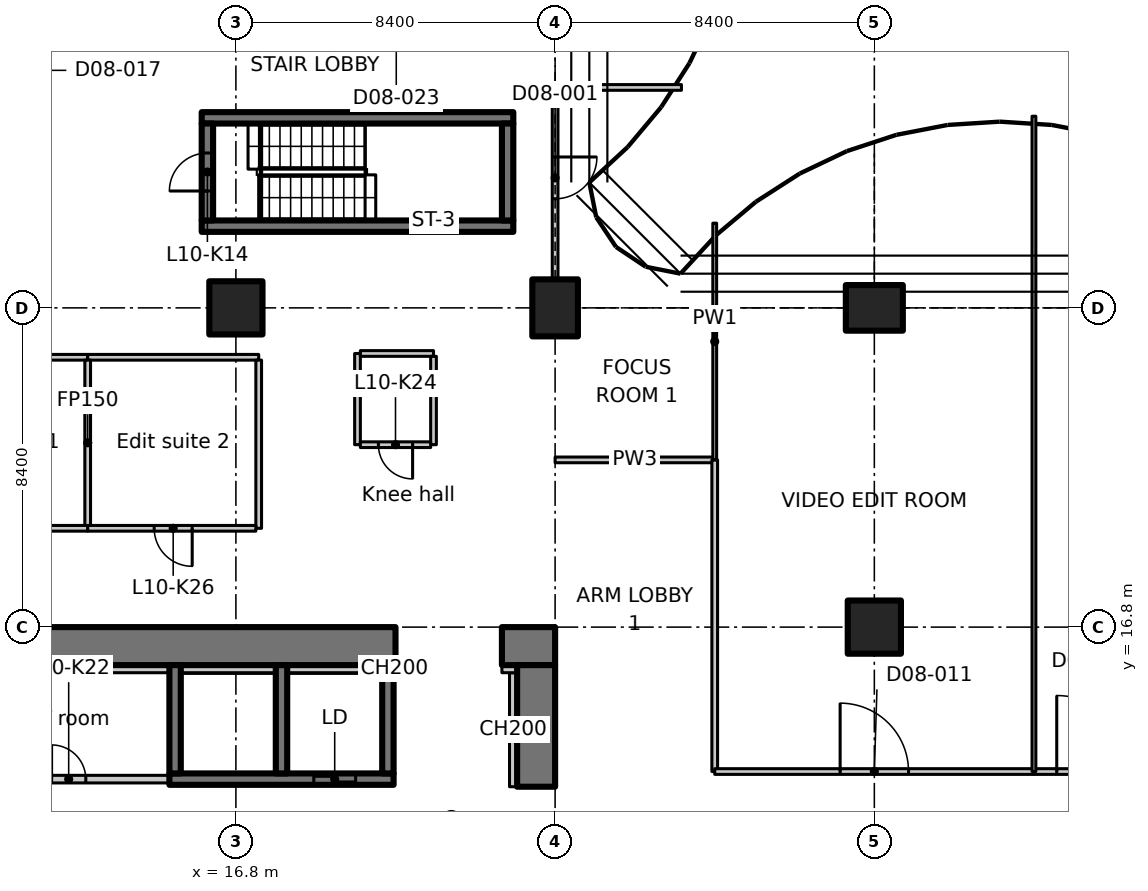
"""IFC4 building model, lengths in metres.
Left out: names, types, materials, properties, quantities, classifications, styles, units other than length and angle.
Written with IfcOpenShell. Run it as: python <this file> out.ifc"""

import sys

from ifc_helpers import new_model, si_unit, direction, frame, frame_2d, origin, origin_2d, place, context, subcontext, project, spatial, polyline, rectangle, outline, extrude, element, fill, save


model = new_model("IFC4")
c1 = context("Model", 3, precision=1e-05, world=origin(), true_north=direction((0.0, 1.0)))
c2 = subcontext(c1, "Body", "Model", "MODEL_VIEW")
j1 = project(units=[si_unit("LENGTHUNIT", "METRE"), si_unit("PLANEANGLEUNIT", "RADIAN")], contexts=[c1])
p1 = place(None, origin())
s1 = spatial("IfcSite", under=j1, at=p1, CompositionType="ELEMENT")
p2 = place(p1, origin())
s2 = spatial("IfcBuilding", under=s1, at=p2, CompositionType="ELEMENT")
p3 = place(p2, frame((0.0, 0.0, 50.9)))
s3 = spatial("IfcBuildingStorey", under=s2, at=p3, CompositionType="ELEMENT", Elevation=50.9)
p4 = place(p3, frame((16.8, 25.2, 0.0), z_axis=(0.0, 0.0, 1.0), x_axis=(1.0, 0.0, 0.0)))
e1 = element("IfcColumn", 1, at=p4, inside=s3, PredefinedType="COLUMN", context=c2, shape_type="SweptSolid", body=[
    extrude(rectangle(XDim=1.4, YDim=1.4, at=origin_2d()), origin(), (0.0, 0.0, 1.0), 3.35),
])
p5 = place(p3, frame((25.2, 25.2, 0.0), z_axis=(0.0, 0.0, 1.0), x_axis=(1.0, 0.0, 0.0)))
e2 = element("IfcColumn", 2, at=p5, inside=s3, PredefinedType="COLUMN", context=c2, shape_type="SweptSolid", body=[
    extrude(rectangle(XDim=1.2, YDim=1.5, at=origin_2d()), origin(), (0.0, 0.0, 1.0), 3.35),
])
p6 = place(p3, frame((33.6, 16.8, 0.0), z_axis=(0.0, 0.0, 1.0), x_axis=(1.0, 0.0, 0.0)))
e3 = element("IfcColumn", 3, at=p6, inside=s3, PredefinedType="COLUMN", context=c2, shape_type="SweptSolid", body=[
    extrude(rectangle(XDim=1.4, YDim=1.4, at=origin_2d()), origin(), (0.0, 0.0, 1.0), 3.35),
])
p7 = place(p3, frame((33.6, 25.2, 0.0), z_axis=(0.0, 0.0, 1.0), x_axis=(0.0, 1.0, 0.0)))
e4 = element("IfcColumn", 4, at=p7, inside=s3, PredefinedType="COLUMN", context=c2, shape_type="SweptSolid", body=[
    extrude(rectangle(XDim=1.2, YDim=1.5, at=origin_2d()), origin(), (0.0, 0.0, 1.0), 3.35),
])
p8 = place(p3, frame((-1.1, 16.3, 0.0), z_axis=(0.0, 0.0, 1.0), x_axis=(1.0, 0.0, 0.0)))
e5 = element("IfcWall", 5, at=p8, inside=s3, PredefinedType="SHEAR", context=c2, shape_type="SweptSolid", body=[
    extrude(rectangle(XDim=22.1, YDim=1.0, at=frame_2d((11.05, 0.0))), origin(), (0.0, 0.0, 1.0), 3.35),
])
p9 = place(p8, frame((3.15, 0.0, 0.0)))
e6 = element("IfcOpeningElement", 6, at=p9, cuts=e5, PredefinedType="OPENING", context=c2, shape_type="SweptSolid", body=[
    extrude(rectangle(XDim=1.1, YDim=2.3, at=frame_2d((0.55, 1.15))), frame((0.0, 0.51, 0.0), z_axis=(0.0, -1.0, 0.0), x_axis=(1.0, 0.0, 0.0)), (0.0, 0.0, 1.0), 1.02),
])
p10 = place(p3, frame((23.8, 16.3, 0.0), z_axis=(0.0, 0.0, 1.0), x_axis=(1.0, 0.0, 0.0)))
e7 = element("IfcWall", 7, at=p10, inside=s3, PredefinedType="SHEAR", context=c2, shape_type="SweptSolid", body=[
    extrude(rectangle(XDim=1.4, YDim=1.0, at=frame_2d((0.7, 0.0))), origin(), (0.0, 0.0, 1.0), 3.35),
])
p11 = place(p3, frame((24.7, 12.6, 0.0), z_axis=(0.0, 0.0, 1.0), x_axis=(0.0, 1.0, 0.0)))
e8 = element("IfcWall", 8, at=p11, inside=s3, PredefinedType="SHEAR", context=c2, shape_type="SweptSolid", body=[
    extrude(rectangle(XDim=3.2, YDim=1.0, at=frame_2d((1.6, 0.0))), origin(), (0.0, 0.0, 1.0), 3.35),
])
p12 = place(p3, frame((24.1, 12.6, 0.0), z_axis=(0.0, 0.0, 1.0), x_axis=(0.0, 1.0, 0.0)))
e9 = element("IfcWall", 9, at=p12, inside=s3, PredefinedType="PARTITIONING", context=c2, shape_type="SweptSolid", body=[
    extrude(rectangle(XDim=3.0, YDim=0.2, at=frame_2d((1.5, 0.0))), origin(), (0.0, 0.0, 1.0), 3.35),
])
p13 = place(p3, frame((23.8, 15.7, 0.0), z_axis=(0.0, 0.0, 1.0), x_axis=(1.0, 0.0, 0.0)))
e10 = element("IfcWall", 10, at=p13, inside=s3, PredefinedType="PARTITIONING", context=c2, shape_type="SweptSolid", body=[
    extrude(rectangle(XDim=0.4, YDim=0.2, at=frame_2d((0.2, 0.0))), origin(), (0.0, 0.0, 1.0), 3.35),
])
p14 = place(p3, frame((15.05, 12.8, 0.0), z_axis=(0.0, 0.0, 1.0), x_axis=(1.0, 0.0, 0.0)))
e11 = element("IfcWall", 11, at=p14, inside=s3, PredefinedType="SHEAR", context=c2, shape_type="SweptSolid", body=[
    extrude(rectangle(XDim=5.9, YDim=0.3, at=frame_2d((2.95, 0.0))), origin(), (0.0, 0.0, 1.0), 3.35),
])
p15 = place(p14, frame((3.8, 0.0, 0.0)))
e12 = element("IfcOpeningElement", 12, at=p15, cuts=e11, PredefinedType="OPENING", context=c2, shape_type="SweptSolid", body=[
    extrude(rectangle(XDim=1.1, YDim=2.3, at=frame_2d((0.55, 1.15))), frame((0.0, 0.16, 0.0), z_axis=(0.0, -1.0, 0.0), x_axis=(1.0, 0.0, 0.0)), (0.0, 0.0, 1.0), 0.32),
])
for number, where, z_axis, x_axis in (
    (13, (15.2, 12.95, 0.0), (0.0, 0.0, 1.0), (0.0, 1.0, 0.0)),
    (14, (18.0, 12.95, 0.0), (0.0, 0.0, 1.0), (0.0, 1.0, 0.0)),
    (15, (20.8, 12.95, 0.0), (0.0, 0.0, 1.0), (0.0, 1.0, 0.0)),
):
    element("IfcWall", number, at=place(p3, frame(where, z_axis=z_axis, x_axis=x_axis)), inside=s3, PredefinedType="SHEAR", context=c2, shape_type="SweptSolid", body=[
        extrude(rectangle(XDim=2.85, YDim=0.3, at=frame_2d((1.425, 0.0))), origin(), (0.0, 0.0, 1.0), 3.35),
    ])
for number, where, z_axis, x_axis in (
    (16, (15.9, 27.35, 0.0), (0.0, 0.0, 1.0), (1.0, 0.0, 0.0)),
    (17, (15.9, 30.2, 0.0), (0.0, 0.0, 1.0), (1.0, 0.0, 0.0)),
):
    element("IfcWall", number, at=place(p3, frame(where, z_axis=z_axis, x_axis=x_axis)), inside=s3, PredefinedType="SHEAR", context=c2, shape_type="SweptSolid", body=[
        extrude(rectangle(XDim=8.2, YDim=0.3, at=frame_2d((4.1, 0.0))), origin(), (0.0, 0.0, 1.0), 3.35),
    ])
p16 = place(p3, frame((16.05, 27.5, 0.0), z_axis=(0.0, 0.0, 1.0), x_axis=(0.0, 1.0, 0.0)))
e18 = element("IfcWall", 18, at=p16, inside=s3, PredefinedType="SHEAR", context=c2, shape_type="SweptSolid", body=[
    extrude(rectangle(XDim=2.55, YDim=0.3, at=frame_2d((1.275, 0.0))), origin(), (0.0, 0.0, 1.0), 3.35),
])
p17 = place(p16, frame((0.775, 0.0, 0.0)))
e19 = element("IfcOpeningElement", 19, at=p17, cuts=e18, PredefinedType="OPENING", context=c2, shape_type="SweptSolid", body=[
    extrude(rectangle(XDim=1.0, YDim=2.1, at=frame_2d((0.5, 1.05))), frame((0.0, 0.16, 0.0), z_axis=(0.0, -1.0, 0.0), x_axis=(1.0, 0.0, 0.0)), (0.0, 0.0, 1.0), 0.32),
])
p18 = place(p3, frame((23.95, 27.5, 0.0), z_axis=(0.0, 0.0, 1.0), x_axis=(0.0, 1.0, 0.0)))
e20 = element("IfcWall", 20, at=p18, inside=s3, PredefinedType="SHEAR", context=c2, shape_type="SweptSolid", body=[
    extrude(rectangle(XDim=2.55, YDim=0.3, at=frame_2d((1.275, 0.0))), origin(), (0.0, 0.0, 1.0), 3.35),
])
p19 = place(p3, frame((9.6, 12.8, 0.0), z_axis=(0.0, 0.0, 1.0), x_axis=(1.0, 0.0, 0.0)))
e21 = element("IfcWall", 21, at=p19, inside=s3, PredefinedType="PARTITIONING", context=c2, shape_type="SweptSolid", body=[
    extrude(rectangle(XDim=5.438, YDim=0.2, at=frame_2d((2.719, 0.0))), origin(), (0.0, 0.0, 1.0), 3.35),
])
p20 = place(p19, frame((2.35, 0.0, 0.0)))
e22 = element("IfcOpeningElement", 22, at=p20, cuts=e21, PredefinedType="OPENING", context=c2, shape_type="SweptSolid", body=[
    extrude(rectangle(XDim=0.9, YDim=2.1, at=frame_2d((0.45, 1.05))), frame((0.0, 0.11, 0.0), z_axis=(0.0, -1.0, 0.0), x_axis=(1.0, 0.0, 0.0)), (0.0, 0.0, 1.0), 0.22),
])
p21 = place(p3, frame((12.9, 19.4, 0.0), z_axis=(0.0, 0.0, 1.0), x_axis=(-1.0, 0.0, 0.0)))
e23 = element("IfcWall", 23, at=p21, inside=s3, PredefinedType="PARTITIONING", context=c2, shape_type="SweptSolid", body=[
    extrude(rectangle(XDim=4.4, YDim=0.15, at=frame_2d((2.2, 0.0))), origin(), (0.0, 0.0, 1.0), 3.35),
])
p22 = place(p21, frame((1.7, 0.0, 0.0)))
e24 = element("IfcOpeningElement", 24, at=p22, cuts=e23, PredefinedType="OPENING", context=c2, shape_type="SweptSolid", body=[
    extrude(rectangle(XDim=1.0, YDim=2.1, at=frame_2d((0.5, 1.05))), frame((0.0, 0.085, 0.0), z_axis=(0.0, -1.0, 0.0), x_axis=(1.0, 0.0, 0.0)), (0.0, 0.0, 1.0), 0.17),
])
p23 = place(p3, frame((8.575, 23.9, 0.0), z_axis=(0.0, 0.0, 1.0), x_axis=(1.0, 0.0, 0.0)))
e25 = element("IfcWall", 25, at=p23, inside=s3, PredefinedType="PARTITIONING", context=c2, shape_type="SweptSolid", body=[
    extrude(rectangle(XDim=4.325, YDim=0.15, at=frame_2d((2.163, 0.0))), origin(), (0.0, 0.0, 1.0), 3.35),
])
p24 = place(p3, frame((12.9, 23.9, 0.0), z_axis=(0.0, 0.0, 1.0), x_axis=(1.0, 0.0, 0.0)))
e26 = element("IfcWall", 26, at=p24, inside=s3, PredefinedType="PARTITIONING", context=c2, shape_type="SweptSolid", body=[
    extrude(rectangle(XDim=4.5, YDim=0.15, at=frame_2d((2.25, 0.0))), origin(), (0.0, 0.0, 1.0), 3.35),
])
p25 = place(p3, frame((17.4, 23.825, 0.0), z_axis=(0.0, 0.0, 1.0), x_axis=(0.0, -1.0, 0.0)))
e27 = element("IfcWall", 27, at=p25, inside=s3, PredefinedType="PARTITIONING", context=c2, shape_type="SweptSolid", body=[
    extrude(rectangle(XDim=4.425, YDim=0.15, at=frame_2d((2.212, 0.0))), origin(), (0.0, 0.0, 1.0), 3.35),
])
p26 = place(p3, frame((17.325, 19.4, 0.0), z_axis=(0.0, 0.0, 1.0), x_axis=(-1.0, 0.0, 0.0)))
e28 = element("IfcWall", 28, at=p26, inside=s3, PredefinedType="PARTITIONING", context=c2, shape_type="SweptSolid", body=[
    extrude(rectangle(XDim=4.425, YDim=0.15, at=frame_2d((2.212, 0.0))), origin(), (0.0, 0.0, 1.0), 3.35),
])
p27 = place(p26, frame((1.675, 0.0, 0.0)))
e29 = element("IfcOpeningElement", 29, at=p27, cuts=e28, PredefinedType="OPENING", context=c2, shape_type="SweptSolid", body=[
    extrude(rectangle(XDim=1.0, YDim=2.1, at=frame_2d((0.5, 1.05))), frame((0.0, 0.085, 0.0), z_axis=(0.0, -1.0, 0.0), x_axis=(1.0, 0.0, 0.0)), (0.0, 0.0, 1.0), 0.17),
])
p28 = place(p3, frame((12.9, 23.825, 0.0), z_axis=(0.0, 0.0, 1.0), x_axis=(0.0, -1.0, 0.0)))
e30 = element("IfcWall", 30, at=p28, inside=s3, PredefinedType="PARTITIONING", context=c2, shape_type="SweptSolid", body=[
    extrude(rectangle(XDim=4.35, YDim=0.15, at=frame_2d((2.175, 0.0))), origin(), (0.0, 0.0, 1.0), 3.35),
])
p29 = place(p3, frame((20.0, 21.6, 0.0), z_axis=(0.0, 0.0, 1.0), x_axis=(0.0, 1.0, 0.0)))
e31 = element("IfcWall", 31, at=p29, inside=s3, PredefinedType="PARTITIONING", context=c2, shape_type="SweptSolid", body=[
    extrude(rectangle(XDim=2.4, YDim=0.15, at=frame_2d((1.2, 0.0))), origin(), (0.0, 0.0, 1.0), 3.35),
])
p30 = place(p3, frame((20.075, 24.0, 0.0), z_axis=(0.0, 0.0, 1.0), x_axis=(1.0, 0.0, 0.0)))
e32 = element("IfcWall", 32, at=p30, inside=s3, PredefinedType="PARTITIONING", context=c2, shape_type="SweptSolid", body=[
    extrude(rectangle(XDim=1.925, YDim=0.15, at=frame_2d((0.962, 0.0))), origin(), (0.0, 0.0, 1.0), 3.35),
])
p31 = place(p3, frame((22.0, 23.925, 0.0), z_axis=(0.0, 0.0, 1.0), x_axis=(0.0, -1.0, 0.0)))
e33 = element("IfcWall", 33, at=p31, inside=s3, PredefinedType="PARTITIONING", context=c2, shape_type="SweptSolid", body=[
    extrude(rectangle(XDim=2.325, YDim=0.15, at=frame_2d((1.163, 0.0))), origin(), (0.0, 0.0, 1.0), 3.35),
])
p32 = place(p3, frame((21.925, 21.6, 0.0), z_axis=(0.0, 0.0, 1.0), x_axis=(-1.0, 0.0, 0.0)))
e34 = element("IfcWall", 34, at=p32, inside=s3, PredefinedType="PARTITIONING", context=c2, shape_type="SweptSolid", body=[
    extrude(rectangle(XDim=1.85, YDim=0.15, at=frame_2d((0.925, 0.0))), origin(), (0.0, 0.0, 1.0), 3.35),
])
p33 = place(p32, frame((0.475, 0.0, 0.0)))
e35 = element("IfcOpeningElement", 35, at=p33, cuts=e34, PredefinedType="OPENING", context=c2, shape_type="SweptSolid", body=[
    extrude(rectangle(XDim=0.9, YDim=2.1, at=frame_2d((0.45, 1.05))), frame((0.0, 0.085, 0.0), z_axis=(0.0, -1.0, 0.0), x_axis=(1.0, 0.0, 0.0)), (0.0, 0.0, 1.0), 0.17),
])
p34 = place(p3, frame((4.15, 15.7, 0.0), z_axis=(0.0, 0.0, 1.0), x_axis=(1.0, 0.0, 0.0)))
e36 = element("IfcWall", 36, at=p34, inside=s3, PredefinedType="PARTITIONING", context=c2, shape_type="SweptSolid", body=[
    extrude(rectangle(XDim=10.9, YDim=0.2, at=frame_2d((5.45, 0.0))), origin(), (0.0, 0.0, 1.0), 3.35),
])
for number, where, z_axis, x_axis in (
    (37, (15.35, 15.7, 0.0), (0.0, 0.0, 1.0), (1.0, 0.0, 0.0)),
    (38, (18.15, 15.7, 0.0), (0.0, 0.0, 1.0), (1.0, 0.0, 0.0)),
):
    element("IfcWall", number, at=place(p3, frame(where, z_axis=z_axis, x_axis=x_axis)), inside=s3, PredefinedType="PARTITIONING", context=c2, shape_type="SweptSolid", body=[
        extrude(rectangle(XDim=2.5, YDim=0.2, at=frame_2d((1.25, 0.0))), origin(), (0.0, 0.0, 1.0), 3.35),
    ])
p35 = place(p3, frame((20.95, 15.7, 0.0), z_axis=(0.0, 0.0, 1.0), x_axis=(1.0, 0.0, 0.0)))
e39 = element("IfcWall", 39, at=p35, inside=s3, PredefinedType="PARTITIONING", context=c2, shape_type="SweptSolid", body=[
    extrude(rectangle(XDim=0.05, YDim=0.2, at=frame_2d((0.025, 0.0))), origin(), (0.0, 0.0, 1.0), 3.35),
])
p36 = place(p3, frame((25.2, 21.2, 0.0), z_axis=(0.0, 0.0, 1.0), x_axis=(1.0, 0.0, 0.0)))
e40 = element("IfcWall", 40, at=p36, inside=s3, PredefinedType="PARTITIONING", context=c2, shape_type="SweptSolid", body=[
    extrude(rectangle(XDim=4.2, YDim=0.15, at=frame_2d((2.1, 0.0))), origin(), (0.0, 0.0, 1.0), 3.33),
])
p37 = place(p3, frame((29.4, 21.2, 0.0), z_axis=(0.0, 0.0, 1.0), x_axis=(0.0, -1.0, 0.0)))
e41 = element("IfcWall", 41, at=p37, inside=s3, PredefinedType="PARTITIONING", context=c2, shape_type="SweptSolid", body=[
    extrude(rectangle(XDim=8.2, YDim=0.15, at=frame_2d((4.1, 0.0))), origin(), (0.0, 0.0, 1.0), 3.33),
])
p38 = place(p3, frame((29.4, 27.429, 0.0), z_axis=(0.0, 0.0, 1.0), x_axis=(0.0, -1.0, 0.0)))
e42 = element("IfcWall", 42, at=p38, inside=s3, PredefinedType="PARTITIONING", context=c2, shape_type="SweptSolid", body=[
    extrude(outline(polyline([(0.0, 0.0), (6.229, 0.0), (6.229, 3.33), (2.679, 3.33), (2.677, 2.98), (1.781, 2.98), (1.779, 3.33), (0.154, 3.33), (0.0, 3.33), (0.0, 0.0)])), frame((0.0, 0.05, 0.0), z_axis=(0.0, -1.0, 0.0), x_axis=(1.0, 0.0, 0.0)), (0.0, 0.0, 1.0), 0.1),
])
p39 = place(p3, frame((25.2, 31.0, 0.0), z_axis=(0.0, 0.0, 1.0), x_axis=(0.0, -1.0, 0.0)))
e43 = element("IfcWall", 43, at=p39, inside=s3, PredefinedType="PARTITIONING", context=c2, shape_type="SweptSolid", body=[
    extrude(outline(polyline([(0.0, 0.0), (5.03, 0.0), (5.03, 2.98), (0.0, 2.98), (0.0, 0.0)])), frame((0.0, 0.075, 0.0), z_axis=(0.0, -1.0, 0.0), x_axis=(1.0, 0.0, 0.0)), (0.0, 0.0, 1.0), 0.15),
])
p40 = place(p39, frame((1.83, 0.0, 0.0)))
e44 = element("IfcOpeningElement", 44, at=p40, cuts=e43, PredefinedType="OPENING", context=c2, shape_type="SweptSolid", body=[
    extrude(rectangle(XDim=1.1, YDim=2.1, at=frame_2d((0.55, 1.05))), frame((0.0, 0.085, 0.0), z_axis=(0.0, -1.0, 0.0), x_axis=(1.0, 0.0, 0.0)), (0.0, 0.0, 1.0), 0.17),
])
p41 = place(p3, frame((25.2, 31.0, 0.0), z_axis=(0.0, 0.0, 1.0), x_axis=(1.0, 0.0, 0.0)))
e45 = element("IfcWall", 45, at=p41, inside=s3, PredefinedType="PARTITIONING", context=c2, shape_type="SweptSolid", body=[
    extrude(rectangle(XDim=3.324, YDim=0.15, at=frame_2d((1.662, 0.0))), origin(), (0.0, 0.0, 1.0), 2.98),
])
p42 = place(p3, frame((29.4, 13.0, 0.0), z_axis=(0.0, 0.0, 1.0), x_axis=(1.0, 0.0, 0.0)))
e46 = element("IfcWall", 46, at=p42, inside=s3, PredefinedType="PARTITIONING", context=c2, shape_type="SweptSolid", body=[
    extrude(rectangle(XDim=8.4, YDim=0.15, at=frame_2d((4.2, 0.0))), origin(), (0.0, 0.0, 1.0), 3.33),
])
p43 = place(p42, frame((3.3, 0.0, 0.0)))
e47 = element("IfcOpeningElement", 47, at=p43, cuts=e46, PredefinedType="OPENING", context=c2, shape_type="SweptSolid", body=[
    extrude(rectangle(XDim=1.8, YDim=2.1, at=frame_2d((0.9, 1.05))), frame((0.0, 0.085, 0.0), z_axis=(0.0, -1.0, 0.0), x_axis=(1.0, 0.0, 0.0)), (0.0, 0.0, 1.0), 0.17),
])
p44 = place(p3, frame((37.8, 13.0, 0.0), z_axis=(0.0, 0.0, 1.0), x_axis=(1.0, 0.0, 0.0)))
e48 = element("IfcWall", 48, at=p44, inside=s3, PredefinedType="PARTITIONING", context=c2, shape_type="SweptSolid", body=[
    extrude(rectangle(XDim=3.4, YDim=0.15, at=frame_2d((1.7, 0.0))), origin(), (0.0, 0.0, 1.0), 3.33),
])
p45 = place(p44, frame((0.6, 0.0, 0.0)))
e49 = element("IfcOpeningElement", 49, at=p45, cuts=e48, PredefinedType="OPENING", context=c2, shape_type="SweptSolid", body=[
    extrude(rectangle(XDim=2.0, YDim=2.4, at=frame_2d((1.0, 1.2))), frame((0.0, 0.085, 0.0), z_axis=(0.0, -1.0, 0.0), x_axis=(1.0, 0.0, 0.0)), (0.0, 0.0, 1.0), 0.17),
])
p46 = place(p3, frame((37.8, 30.243, 0.0), z_axis=(0.0, 0.0, 1.0), x_axis=(0.0, -1.0, 0.0)))
e50 = element("IfcWall", 50, at=p46, inside=s3, PredefinedType="PARTITIONING", context=c2, shape_type="SweptSolid", body=[
    extrude(outline(polyline([(0.0, 0.0), (17.243, 0.0), (17.243, 3.33), (5.493, 3.33), (5.491, 2.98), (4.595, 2.98), (4.593, 3.33), (0.0, 3.33), (0.0, 0.0)])), frame((0.0, 0.05, 0.0), z_axis=(0.0, -1.0, 0.0), x_axis=(1.0, 0.0, 0.0)), (0.0, 0.0, 1.0), 0.1),
])
p47 = place(p15, origin())
e51 = element("IfcDoor", 51, at=p47, inside=s3, OperationType="SLIDING_TO_LEFT", PredefinedType="DOOR", context=c2, shape_type="SweptSolid", body=[
    extrude(rectangle(XDim=1.1, YDim=2.3, at=frame_2d((0.55, 1.15))), frame((0.0, 0.025, 0.0), z_axis=(0.0, -1.0, 0.0), x_axis=(1.0, 0.0, 0.0)), (0.0, 0.0, 1.0), 0.05),
])
fill(e12, e51)
p48 = place(p17, origin())
e52 = element("IfcDoor", 52, at=p48, inside=s3, OperationType="SINGLE_SWING_RIGHT", PredefinedType="DOOR", context=c2, shape_type="SweptSolid", body=[
    extrude(rectangle(XDim=1.0, YDim=2.1, at=frame_2d((0.5, 1.05))), frame((0.0, 0.025, 0.0), z_axis=(0.0, -1.0, 0.0), x_axis=(1.0, 0.0, 0.0)), (0.0, 0.0, 1.0), 0.05),
])
fill(e19, e52)
p49 = place(p20, origin())
e53 = element("IfcDoor", 53, at=p49, inside=s3, OperationType="SINGLE_SWING_RIGHT", PredefinedType="DOOR", context=c2, shape_type="SweptSolid", body=[
    extrude(rectangle(XDim=0.9, YDim=2.1, at=frame_2d((0.45, 1.05))), frame((0.0, 0.025, 0.0), z_axis=(0.0, -1.0, 0.0), x_axis=(1.0, 0.0, 0.0)), (0.0, 0.0, 1.0), 0.05),
])
fill(e22, e53)
p50 = place(p33, origin())
e54 = element("IfcDoor", 54, at=p50, inside=s3, OperationType="SINGLE_SWING_RIGHT", PredefinedType="DOOR", context=c2, shape_type="SweptSolid", body=[
    extrude(rectangle(XDim=0.9, YDim=2.1, at=frame_2d((0.45, 1.05))), frame((0.0, 0.025, 0.0), z_axis=(0.0, -1.0, 0.0), x_axis=(1.0, 0.0, 0.0)), (0.0, 0.0, 1.0), 0.05),
])
fill(e35, e54)
p51 = place(p27, origin())
e55 = element("IfcDoor", 55, at=p51, inside=s3, OperationType="SINGLE_SWING_RIGHT", PredefinedType="DOOR", context=c2, shape_type="SweptSolid", body=[
    extrude(rectangle(XDim=1.0, YDim=2.1, at=frame_2d((0.5, 1.05))), frame((0.0, 0.025, 0.0), z_axis=(0.0, -1.0, 0.0), x_axis=(1.0, 0.0, 0.0)), (0.0, 0.0, 1.0), 0.05),
])
fill(e29, e55)
p52 = place(p40, origin())
e56 = element("IfcDoor", 56, at=p52, inside=s3, OperationType="SINGLE_SWING_RIGHT", PredefinedType="DOOR", context=c2, shape_type="SweptSolid", body=[
    extrude(rectangle(XDim=1.1, YDim=2.1, at=frame_2d((0.55, 1.05))), frame((0.0, 0.025, 0.0), z_axis=(0.0, -1.0, 0.0), x_axis=(1.0, 0.0, 0.0)), (0.0, 0.0, 1.0), 0.05),
])
fill(e44, e56)
p53 = place(p43, origin())
e57 = element("IfcDoor", 57, at=p53, inside=s3, OperationType="DOUBLE_DOOR_SINGLE_SWING", PredefinedType="DOOR", context=c2, shape_type="SweptSolid", body=[
    extrude(rectangle(XDim=1.8, YDim=2.1, at=frame_2d((0.9, 1.05))), frame((0.0, 0.025, 0.0), z_axis=(0.0, -1.0, 0.0), x_axis=(1.0, 0.0, 0.0)), (0.0, 0.0, 1.0), 0.05),
])
fill(e47, e57)
p54 = place(p45, origin())
e58 = element("IfcDoor", 58, at=p54, inside=s3, OperationType="DOUBLE_DOOR_SINGLE_SWING", PredefinedType="DOOR", context=c2, shape_type="SweptSolid", body=[
    extrude(rectangle(XDim=2.0, YDim=2.4, at=frame_2d((1.0, 1.2))), frame((0.0, 0.025, 0.0), z_axis=(0.0, -1.0, 0.0), x_axis=(1.0, 0.0, 0.0)), (0.0, 0.0, 1.0), 0.05),
])
fill(e49, e58)
save(model, sys.argv[1])
